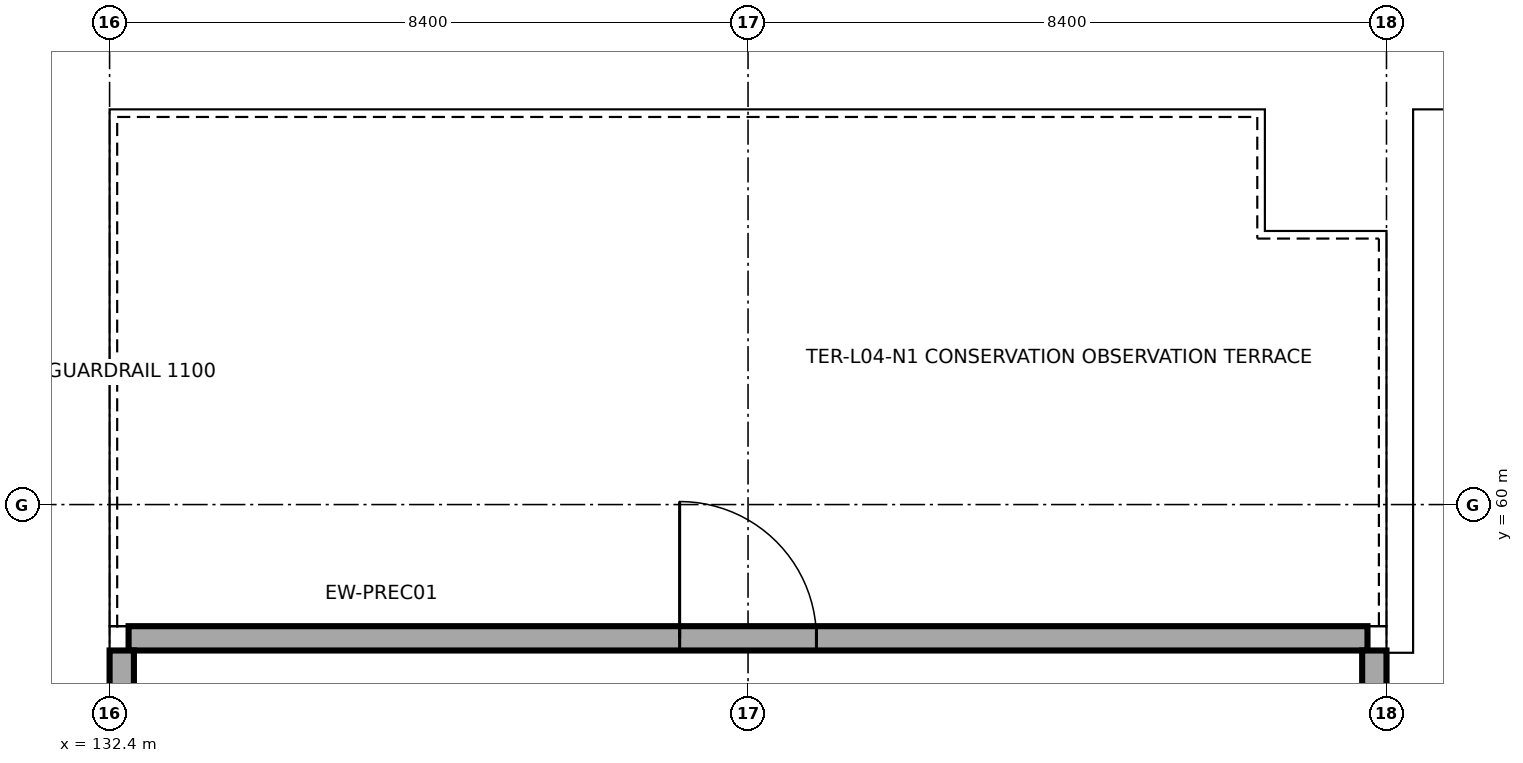
"""IFC4 building model, lengths in metres.
Left out: names, types, materials, properties, quantities, classifications, styles, units other than length and angle.
Written with IfcOpenShell. Run it as: python <this file> out.ifc"""

import sys

from ifc_helpers import new_model, si_unit, direction, frame, frame_2d, origin, place, context, subcontext, project, spatial, rectangle, extrude, element, fill, save


model = new_model("IFC4")
c1 = context("Model", 3, precision=1e-05, world=origin(), true_north=direction((0.0, 1.0)))
c2 = subcontext(c1, "Body", "Model", "MODEL_VIEW")
j1 = project(units=[si_unit("LENGTHUNIT", "METRE"), si_unit("PLANEANGLEUNIT", "RADIAN")], contexts=[c1])
p1 = place(None, origin())
s1 = spatial("IfcSite", under=j1, at=p1, CompositionType="ELEMENT")
p2 = place(p1, origin())
s2 = spatial("IfcBuilding", under=s1, at=p2, CompositionType="ELEMENT")
p3 = place(p2, frame((0.0, 0.0, 21.9)))
s3 = spatial("IfcBuildingStorey", under=s2, at=p3, CompositionType="ELEMENT", Elevation=21.9)
p4 = place(p3, frame((132.65, 58.24, 0.0), z_axis=(0.0, 0.0, 1.0), x_axis=(1.0, 0.0, 0.0)))
e1 = element("IfcWall", 1, at=p4, inside=s3, PredefinedType="SOLIDWALL", context=c2, shape_type="SweptSolid", body=[
    extrude(rectangle(XDim=16.3, YDim=0.32, at=frame_2d((8.15, 0.0))), origin(), (0.0, 0.0, 1.0), 3.88),
])
p5 = place(p4, frame((7.25, 0.0, 0.0)))
e2 = element("IfcOpeningElement", 2, at=p5, cuts=e1, PredefinedType="OPENING", context=c2, shape_type="SweptSolid", body=[
    extrude(rectangle(XDim=1.8, YDim=2.3, at=frame_2d((0.9, 1.15))), frame((0.0, 0.17, 0.0), z_axis=(0.0, -1.0, 0.0), x_axis=(1.0, 0.0, 0.0)), (0.0, 0.0, 1.0), 0.34),
])
for number, where, z_axis, x_axis in (
    (3, (132.56, 48.17, 0.0), (0.0, 0.0, 1.0), (0.0, 1.0, 0.0)),
    (4, (149.04, 58.08, 0.0), (0.0, 0.0, 1.0), (0.0, -1.0, 0.0)),
):
    element("IfcWall", number, at=place(p3, frame(where, z_axis=z_axis, x_axis=x_axis)), inside=s3, PredefinedType="SOLIDWALL", context=c2, shape_type="SweptSolid", body=[
        extrude(rectangle(XDim=9.91, YDim=0.32, at=frame_2d((4.955, 0.0))), origin(), (0.0, 0.0, 1.0), 3.682),
    ])
p6 = place(p5, origin())
e5 = element("IfcDoor", 5, at=p6, inside=s3, OperationType="DOUBLE_DOOR_SINGLE_SWING", PredefinedType="DOOR", context=c2, shape_type="SweptSolid", body=[
    extrude(rectangle(XDim=1.8, YDim=2.3, at=frame_2d((0.9, 1.15))), frame((0.0, 0.025, 0.0), z_axis=(0.0, -1.0, 0.0), x_axis=(1.0, 0.0, 0.0)), (0.0, 0.0, 1.0), 0.05),
])
fill(e2, e5)
save(model, sys.argv[1])
